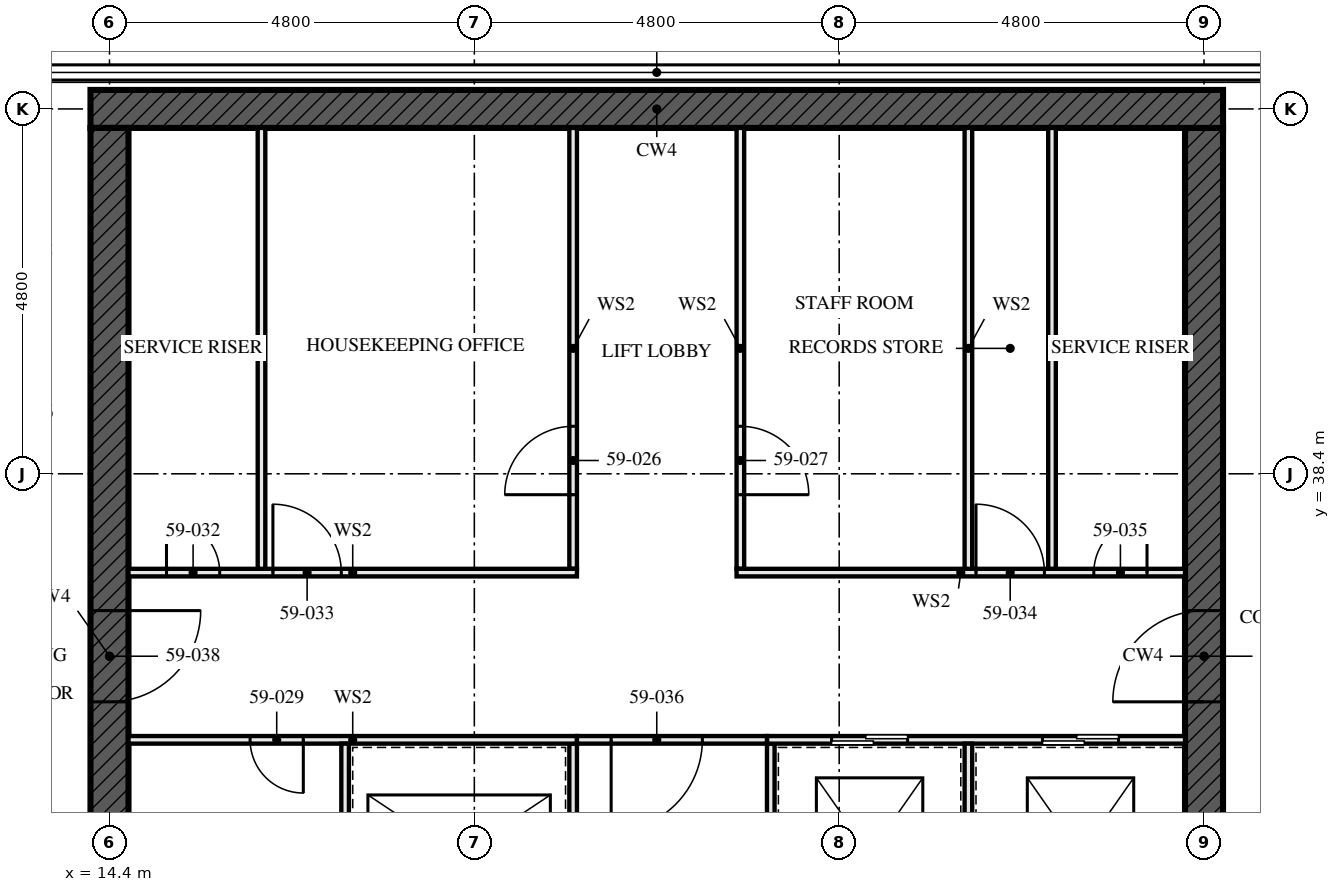
"""IFC4 building model, lengths in metres.
Left out: names, types, materials, properties, quantities, classifications, styles, units other than length and angle.
Written with IfcOpenShell. Run it as: python <this file> out.ifc"""

import sys

from ifc_helpers import new_model, si_unit, direction, frame, frame_2d, origin, place, context, subcontext, project, spatial, rectangle, extrude, element, fill, save


model = new_model("IFC4")
c1 = context("Model", 3, precision=1e-05, world=origin(), true_north=direction((0.0, 1.0)))
c2 = subcontext(c1, "Body", "Model", "MODEL_VIEW")
j1 = project(units=[si_unit("LENGTHUNIT", "METRE"), si_unit("PLANEANGLEUNIT", "RADIAN")], contexts=[c1])
p1 = place(None, origin())
s1 = spatial("IfcSite", under=j1, at=p1, CompositionType="ELEMENT")
p2 = place(p1, origin())
s2 = spatial("IfcBuilding", under=s1, at=p2, CompositionType="ELEMENT")
p3 = place(p2, frame((0.0, 0.0, 215.5)))
s3 = spatial("IfcBuildingStorey", under=s2, at=p3, CompositionType="ELEMENT", Elevation=215.5)
p4 = place(p3, frame((29.05, 43.2, -0.17), z_axis=(0.0, 0.0, 1.0), x_axis=(-1.0, 0.0, 0.0)))
e1 = element("IfcWall", 1, at=p4, inside=s3, PredefinedType="SHEAR", context=c2, shape_type="SweptSolid", body=[
    extrude(rectangle(XDim=14.9, YDim=0.5, at=frame_2d((7.45, 0.0))), origin(), (0.0, 0.0, 1.0), 3.5),
])
p5 = place(p3, frame((14.4, 42.95, -0.17), z_axis=(0.0, 0.0, 1.0), x_axis=(0.0, -1.0, 0.0)))
e2 = element("IfcWall", 2, at=p5, inside=s3, PredefinedType="SHEAR", context=c2, shape_type="SweptSolid", body=[
    extrude(rectangle(XDim=13.9, YDim=0.5, at=frame_2d((6.95, 0.0))), origin(), (0.0, 0.0, 1.0), 3.5),
])
p6 = place(p5, frame((6.35, 0.0, 0.17)))
e3 = element("IfcOpeningElement", 3, at=p6, cuts=e2, PredefinedType="OPENING", context=c2, shape_type="SweptSolid", body=[
    extrude(rectangle(XDim=1.2, YDim=2.1, at=frame_2d((0.6, 1.05))), frame((0.0, 0.26, 0.0), z_axis=(0.0, -1.0, 0.0), x_axis=(1.0, 0.0, 0.0)), (0.0, 0.0, 1.0), 0.521),
])
p7 = place(p3, frame((28.8, 29.05, -0.17), z_axis=(0.0, 0.0, 1.0), x_axis=(0.0, 1.0, 0.0)))
e4 = element("IfcWall", 4, at=p7, inside=s3, PredefinedType="SHEAR", context=c2, shape_type="SweptSolid", body=[
    extrude(rectangle(XDim=13.9, YDim=0.5, at=frame_2d((6.95, 0.0))), origin(), (0.0, 0.0, 1.0), 3.5),
])
p8 = place(p7, frame((6.35, 0.0, 0.17)))
e5 = element("IfcOpeningElement", 5, at=p8, cuts=e4, PredefinedType="OPENING", context=c2, shape_type="SweptSolid", body=[
    extrude(rectangle(XDim=1.2, YDim=2.1, at=frame_2d((0.6, 1.05))), frame((0.0, 0.26, 0.0), z_axis=(0.0, -1.0, 0.0), x_axis=(1.0, 0.0, 0.0)), (0.0, 0.0, 1.0), 0.521),
])
for number, where, z_axis, x_axis in (
    (6, (16.4, 37.15, 0.0), (0.0, 0.0, 1.0), (0.0, 1.0, 0.0)),
    (7, (26.8, 37.15, 0.0), (0.0, 0.0, 1.0), (0.0, 1.0, 0.0)),
):
    element("IfcWall", number, at=place(p3, frame(where, z_axis=z_axis, x_axis=x_axis)), inside=s3, PredefinedType="SOLIDWALL", context=c2, shape_type="SweptSolid", body=[
        extrude(rectangle(XDim=5.8, YDim=0.1, at=frame_2d((2.9, 0.0))), origin(), (0.0, 0.0, 1.0), 3.33),
    ])
p9 = place(p3, frame((20.5, 29.05, 0.0), z_axis=(0.0, 0.0, 1.0), x_axis=(0.0, 1.0, 0.0)))
e8 = element("IfcWall", 8, at=p9, inside=s3, PredefinedType="SOLIDWALL", context=c2, shape_type="SweptSolid", body=[
    extrude(rectangle(XDim=5.8, YDim=0.1, at=frame_2d((2.9, 0.0))), origin(), (0.0, 0.0, 1.0), 3.33),
])
p10 = place(p9, frame((0.8, 0.0, 0.0)))
e9 = element("IfcOpeningElement", 9, at=p10, cuts=e8, PredefinedType="OPENING", context=c2, shape_type="SweptSolid", body=[
    extrude(rectangle(XDim=1.1, YDim=2.3, at=frame_2d((0.55, 1.15))), frame((0.0, 0.061, 0.0), z_axis=(0.0, -1.0, 0.0), x_axis=(1.0, 0.0, 0.0)), (0.0, 0.0, 1.0), 0.121),
])
p11 = place(p9, frame((3.775, 0.0, 0.0)))
e10 = element("IfcOpeningElement", 10, at=p11, cuts=e8, PredefinedType="OPENING", context=c2, shape_type="SweptSolid", body=[
    extrude(rectangle(XDim=1.1, YDim=2.3, at=frame_2d((0.55, 1.15))), frame((0.0, 0.061, 0.0), z_axis=(0.0, -1.0, 0.0), x_axis=(1.0, 0.0, 0.0)), (0.0, 0.0, 1.0), 0.121),
])
p12 = place(p3, frame((20.5, 37.15, 0.0), z_axis=(0.0, 0.0, 1.0), x_axis=(0.0, 1.0, 0.0)))
e11 = element("IfcWall", 11, at=p12, inside=s3, PredefinedType="SOLIDWALL", context=c2, shape_type="SweptSolid", body=[
    extrude(rectangle(XDim=5.8, YDim=0.1, at=frame_2d((2.9, 0.0))), origin(), (0.0, 0.0, 1.0), 3.33),
])
p13 = place(p12, frame((0.975, 0.0, 0.0)))
e12 = element("IfcOpeningElement", 12, at=p13, cuts=e11, PredefinedType="OPENING", context=c2, shape_type="SweptSolid", body=[
    extrude(rectangle(XDim=0.9, YDim=2.1, at=frame_2d((0.45, 1.05))), frame((0.0, 0.061, 0.0), z_axis=(0.0, -1.0, 0.0), x_axis=(1.0, 0.0, 0.0)), (0.0, 0.0, 1.0), 0.121),
])
p14 = place(p3, frame((22.7, 37.15, 0.0), z_axis=(0.0, 0.0, 1.0), x_axis=(0.0, 1.0, 0.0)))
e13 = element("IfcWall", 13, at=p14, inside=s3, PredefinedType="SOLIDWALL", context=c2, shape_type="SweptSolid", body=[
    extrude(rectangle(XDim=5.8, YDim=0.1, at=frame_2d((2.9, 0.0))), origin(), (0.0, 0.0, 1.0), 3.33),
])
p15 = place(p14, frame((0.975, 0.0, 0.0)))
e14 = element("IfcOpeningElement", 14, at=p15, cuts=e13, PredefinedType="OPENING", context=c2, shape_type="SweptSolid", body=[
    extrude(rectangle(XDim=0.9, YDim=2.1, at=frame_2d((0.45, 1.05))), frame((0.0, 0.061, 0.0), z_axis=(0.0, -1.0, 0.0), x_axis=(1.0, 0.0, 0.0)), (0.0, 0.0, 1.0), 0.121),
])
p16 = place(p3, frame((23.1, 29.05, 0.0), z_axis=(0.0, 0.0, 1.0), x_axis=(0.0, 1.0, 0.0)))
e15 = element("IfcWall", 15, at=p16, inside=s3, PredefinedType="SOLIDWALL", context=c2, shape_type="SweptSolid", body=[
    extrude(rectangle(XDim=5.8, YDim=0.1, at=frame_2d((2.9, 0.0))), origin(), (0.0, 0.0, 1.0), 3.33),
])
p17 = place(p16, frame((1.0, 0.0, 0.0)))
e16 = element("IfcOpeningElement", 16, at=p17, cuts=e15, PredefinedType="OPENING", context=c2, shape_type="SweptSolid", body=[
    extrude(rectangle(XDim=0.7, YDim=2.1, at=frame_2d((0.35, 1.05))), frame((0.0, 0.061, 0.0), z_axis=(0.0, -1.0, 0.0), x_axis=(1.0, 0.0, 0.0)), (0.0, 0.0, 1.0), 0.121),
])
p18 = place(p3, frame((14.65, 34.9, 0.0), z_axis=(0.0, 0.0, 1.0), x_axis=(1.0, 0.0, 0.0)))
e17 = element("IfcWall", 17, at=p18, inside=s3, PredefinedType="SOLIDWALL", context=c2, shape_type="SweptSolid", body=[
    extrude(rectangle(XDim=5.9, YDim=0.1, at=frame_2d((2.95, 0.0))), origin(), (0.0, 0.0, 1.0), 3.33),
])
p19 = place(p18, frame((1.6, 0.0, 0.0)))
e18 = element("IfcOpeningElement", 18, at=p19, cuts=e17, PredefinedType="OPENING", context=c2, shape_type="SweptSolid", body=[
    extrude(rectangle(XDim=0.7, YDim=2.1, at=frame_2d((0.35, 1.05))), frame((0.0, 0.061, 0.0), z_axis=(0.0, -1.0, 0.0), x_axis=(1.0, 0.0, 0.0)), (0.0, 0.0, 1.0), 0.121),
])
p20 = place(p3, frame((23.05, 34.9, 0.0), z_axis=(0.0, 0.0, 1.0), x_axis=(1.0, 0.0, 0.0)))
e19 = element("IfcWall", 19, at=p20, inside=s3, PredefinedType="SOLIDWALL", context=c2, shape_type="SweptSolid", body=[
    extrude(rectangle(XDim=5.5, YDim=0.1, at=frame_2d((2.75, 0.0))), origin(), (0.0, 0.0, 1.0), 3.33),
])
p21 = place(p20, frame((0.85, 0.0, 0.0)))
e20 = element("IfcOpeningElement", 20, at=p21, cuts=e19, PredefinedType="OPENING", context=c2, shape_type="SweptSolid", body=[
    extrude(rectangle(XDim=1.0, YDim=2.1, at=frame_2d((0.5, 1.05))), frame((0.0, 0.061, 0.0), z_axis=(0.0, -1.0, 0.0), x_axis=(1.0, 0.0, 0.0)), (0.0, 0.0, 1.0), 0.121),
])
p22 = place(p20, frame((3.625, 0.0, 0.0)))
e21 = element("IfcOpeningElement", 21, at=p22, cuts=e19, PredefinedType="OPENING", context=c2, shape_type="SweptSolid", body=[
    extrude(rectangle(XDim=1.0, YDim=2.1, at=frame_2d((0.5, 1.05))), frame((0.0, 0.061, 0.0), z_axis=(0.0, -1.0, 0.0), x_axis=(1.0, 0.0, 0.0)), (0.0, 0.0, 1.0), 0.121),
])
p23 = place(p3, frame((14.65, 37.1, 0.0), z_axis=(0.0, 0.0, 1.0), x_axis=(1.0, 0.0, 0.0)))
e22 = element("IfcWall", 22, at=p23, inside=s3, PredefinedType="SOLIDWALL", context=c2, shape_type="SweptSolid", body=[
    extrude(rectangle(XDim=5.9, YDim=0.1, at=frame_2d((2.95, 0.0))), origin(), (0.0, 0.0, 1.0), 3.33),
])
p24 = place(p23, frame((0.5, 0.0, 0.0)))
e23 = element("IfcOpeningElement", 23, at=p24, cuts=e22, PredefinedType="OPENING", context=c2, shape_type="SweptSolid", body=[
    extrude(rectangle(XDim=0.7, YDim=2.1, at=frame_2d((0.35, 1.05))), frame((0.0, 0.061, 0.0), z_axis=(0.0, -1.0, 0.0), x_axis=(1.0, 0.0, 0.0)), (0.0, 0.0, 1.0), 0.121),
])
p25 = place(p23, frame((1.9, 0.0, 0.0)))
e24 = element("IfcOpeningElement", 24, at=p25, cuts=e22, PredefinedType="OPENING", context=c2, shape_type="SweptSolid", body=[
    extrude(rectangle(XDim=0.9, YDim=2.1, at=frame_2d((0.45, 1.05))), frame((0.0, 0.061, 0.0), z_axis=(0.0, -1.0, 0.0), x_axis=(1.0, 0.0, 0.0)), (0.0, 0.0, 1.0), 0.121),
])
p26 = place(p3, frame((22.65, 37.1, 0.0), z_axis=(0.0, 0.0, 1.0), x_axis=(1.0, 0.0, 0.0)))
e25 = element("IfcWall", 25, at=p26, inside=s3, PredefinedType="SOLIDWALL", context=c2, shape_type="SweptSolid", body=[
    extrude(rectangle(XDim=5.9, YDim=0.1, at=frame_2d((2.95, 0.0))), origin(), (0.0, 0.0, 1.0), 3.33),
])
p27 = place(p26, frame((3.15, 0.0, 0.0)))
e26 = element("IfcOpeningElement", 26, at=p27, cuts=e25, PredefinedType="OPENING", context=c2, shape_type="SweptSolid", body=[
    extrude(rectangle(XDim=0.9, YDim=2.1, at=frame_2d((0.45, 1.05))), frame((0.0, 0.061, 0.0), z_axis=(0.0, -1.0, 0.0), x_axis=(1.0, 0.0, 0.0)), (0.0, 0.0, 1.0), 0.121),
])
p28 = place(p26, frame((4.7, 0.0, 0.0)))
e27 = element("IfcOpeningElement", 27, at=p28, cuts=e25, PredefinedType="OPENING", context=c2, shape_type="SweptSolid", body=[
    extrude(rectangle(XDim=0.7, YDim=2.1, at=frame_2d((0.35, 1.05))), frame((0.0, 0.061, 0.0), z_axis=(0.0, -1.0, 0.0), x_axis=(1.0, 0.0, 0.0)), (0.0, 0.0, 1.0), 0.121),
])
p29 = place(p3, frame((20.55, 34.9, 0.0), z_axis=(0.0, 0.0, 1.0), x_axis=(1.0, 0.0, 0.0)))
e28 = element("IfcWall", 28, at=p29, inside=s3, PredefinedType="SOLIDWALL", context=c2, shape_type="SweptSolid", body=[
    extrude(rectangle(XDim=2.5, YDim=0.1, at=frame_2d((1.25, 0.0))), origin(), (0.0, 0.0, 1.0), 3.33),
])
p30 = place(p29, frame((0.45, 0.0, 0.0)))
e29 = element("IfcOpeningElement", 29, at=p30, cuts=e28, PredefinedType="OPENING", context=c2, shape_type="SweptSolid", body=[
    extrude(rectangle(XDim=1.2, YDim=2.1, at=frame_2d((0.6, 1.05))), frame((0.0, 0.061, 0.0), z_axis=(0.0, -1.0, 0.0), x_axis=(1.0, 0.0, 0.0)), (0.0, 0.0, 1.0), 0.121),
])
for number, where, z_axis, x_axis in (
    (30, (17.5, 29.05, 0.0), (0.0, 0.0, 1.0), (0.0, 1.0, 0.0)),
    (31, (25.7, 37.15, 0.0), (0.0, 0.0, 1.0), (0.0, 1.0, 0.0)),
):
    element("IfcWall", number, at=place(p3, frame(where, z_axis=z_axis, x_axis=x_axis)), inside=s3, PredefinedType="SOLIDWALL", context=c2, shape_type="SweptSolid", body=[
        extrude(rectangle(XDim=5.8, YDim=0.1, at=frame_2d((2.9, 0.0))), origin(), (0.0, 0.0, 1.0), 3.33),
    ])
p31 = place(p3, frame((25.7, 31.95, 0.0), z_axis=(0.0, 0.0, 1.0), x_axis=(0.0, 1.0, 0.0)))
e32 = element("IfcWall", 32, at=p31, inside=s3, PredefinedType="SOLIDWALL", context=c2, shape_type="SweptSolid", body=[
    extrude(rectangle(XDim=2.9, YDim=0.1, at=frame_2d((1.45, 0.0))), origin(), (0.0, 0.0, 1.0), 3.33),
])
p32 = place(p13, origin())
e33 = element("IfcDoor", 33, at=p32, inside=s3, OperationType="SINGLE_SWING_RIGHT", PredefinedType="DOOR", context=c2, shape_type="SweptSolid", body=[
    extrude(rectangle(XDim=0.9, YDim=2.1, at=frame_2d((0.45, 1.05))), frame((0.0, 0.027, 0.0), z_axis=(0.0, -1.0, 0.0), x_axis=(1.0, 0.0, 0.0)), (0.0, 0.0, 1.0), 0.054),
])
fill(e12, e33)
p33 = place(p15, frame((0.9, 0.0, 0.0), z_axis=(0.0, 0.0, 1.0), x_axis=(-1.0, 0.0, 0.0)))
e34 = element("IfcDoor", 34, at=p33, inside=s3, OperationType="SINGLE_SWING_LEFT", PredefinedType="DOOR", context=c2, shape_type="SweptSolid", body=[
    extrude(rectangle(XDim=0.9, YDim=2.1, at=frame_2d((0.45, 1.05))), frame((0.0, 0.027, 0.0), z_axis=(0.0, -1.0, 0.0), x_axis=(1.0, 0.0, 0.0)), (0.0, 0.0, 1.0), 0.054),
])
fill(e14, e34)
p34 = place(p19, frame((0.7, 0.0, 0.0), z_axis=(0.0, 0.0, 1.0), x_axis=(-1.0, 0.0, 0.0)))
e35 = element("IfcDoor", 35, at=p34, inside=s3, OperationType="SINGLE_SWING_RIGHT", PredefinedType="DOOR", context=c2, shape_type="SweptSolid", body=[
    extrude(rectangle(XDim=0.7, YDim=2.1, at=frame_2d((0.35, 1.05))), frame((0.0, 0.027, 0.0), z_axis=(0.0, -1.0, 0.0), x_axis=(1.0, 0.0, 0.0)), (0.0, 0.0, 1.0), 0.054),
])
fill(e18, e35)
p35 = place(p21, origin())
e36 = element("IfcDoor", 36, at=p35, inside=s3, OperationType="SLIDING_TO_LEFT", PredefinedType="DOOR", context=c2, shape_type="SweptSolid", body=[
    extrude(rectangle(XDim=1.0, YDim=2.1, at=frame_2d((0.5, 1.05))), frame((0.0, 0.05, 0.0), z_axis=(0.0, -1.0, 0.0), x_axis=(1.0, 0.0, 0.0)), (0.0, 0.0, 1.0), 0.1),
])
fill(e20, e36)
p36 = place(p22, origin())
e37 = element("IfcDoor", 37, at=p36, inside=s3, OperationType="SLIDING_TO_LEFT", PredefinedType="DOOR", context=c2, shape_type="SweptSolid", body=[
    extrude(rectangle(XDim=1.0, YDim=2.1, at=frame_2d((0.5, 1.05))), frame((0.0, 0.05, 0.0), z_axis=(0.0, -1.0, 0.0), x_axis=(1.0, 0.0, 0.0)), (0.0, 0.0, 1.0), 0.1),
])
fill(e21, e37)
p37 = place(p24, origin())
e38 = element("IfcDoor", 38, at=p37, inside=s3, OperationType="SINGLE_SWING_RIGHT", PredefinedType="DOOR", context=c2, shape_type="SweptSolid", body=[
    extrude(rectangle(XDim=0.7, YDim=2.1, at=frame_2d((0.35, 1.05))), frame((0.0, 0.027, 0.0), z_axis=(0.0, -1.0, 0.0), x_axis=(1.0, 0.0, 0.0)), (0.0, 0.0, 1.0), 0.054),
])
fill(e23, e38)
p38 = place(p25, origin())
e39 = element("IfcDoor", 39, at=p38, inside=s3, OperationType="SINGLE_SWING_RIGHT", PredefinedType="DOOR", context=c2, shape_type="SweptSolid", body=[
    extrude(rectangle(XDim=0.9, YDim=2.1, at=frame_2d((0.45, 1.05))), frame((0.0, 0.027, 0.0), z_axis=(0.0, -1.0, 0.0), x_axis=(1.0, 0.0, 0.0)), (0.0, 0.0, 1.0), 0.054),
])
fill(e24, e39)
p39 = place(p27, origin())
e40 = element("IfcDoor", 40, at=p39, inside=s3, OperationType="SINGLE_SWING_RIGHT", PredefinedType="DOOR", context=c2, shape_type="SweptSolid", body=[
    extrude(rectangle(XDim=0.9, YDim=2.1, at=frame_2d((0.45, 1.05))), frame((0.0, 0.027, 0.0), z_axis=(0.0, -1.0, 0.0), x_axis=(1.0, 0.0, 0.0)), (0.0, 0.0, 1.0), 0.054),
])
fill(e26, e40)
p40 = place(p28, origin())
e41 = element("IfcDoor", 41, at=p40, inside=s3, OperationType="SINGLE_SWING_LEFT", PredefinedType="DOOR", context=c2, shape_type="SweptSolid", body=[
    extrude(rectangle(XDim=0.7, YDim=2.1, at=frame_2d((0.35, 1.05))), frame((0.0, 0.027, 0.0), z_axis=(0.0, -1.0, 0.0), x_axis=(1.0, 0.0, 0.0)), (0.0, 0.0, 1.0), 0.054),
])
fill(e27, e41)
p41 = place(p30, frame((1.2, 0.0, 0.0), z_axis=(0.0, 0.0, 1.0), x_axis=(-1.0, 0.0, 0.0)))
e42 = element("IfcDoor", 42, at=p41, inside=s3, OperationType="SINGLE_SWING_LEFT", PredefinedType="DOOR", context=c2, shape_type="SweptSolid", body=[
    extrude(rectangle(XDim=1.2, YDim=2.1, at=frame_2d((0.6, 1.05))), frame((0.0, 0.027, 0.0), z_axis=(0.0, -1.0, 0.0), x_axis=(1.0, 0.0, 0.0)), (0.0, 0.0, 1.0), 0.054),
])
fill(e29, e42)
p42 = place(p6, origin())
e43 = element("IfcDoor", 43, at=p42, inside=s3, OperationType="SINGLE_SWING_LEFT", PredefinedType="DOOR", context=c2, shape_type="SweptSolid", body=[
    extrude(rectangle(XDim=1.2, YDim=2.1, at=frame_2d((0.6, 1.05))), frame((0.0, 0.027, 0.0), z_axis=(0.0, -1.0, 0.0), x_axis=(1.0, 0.0, 0.0)), (0.0, 0.0, 1.0), 0.054),
])
fill(e3, e43)
p43 = place(p8, origin())
e44 = element("IfcDoor", 44, at=p43, inside=s3, OperationType="SINGLE_SWING_LEFT", PredefinedType="DOOR", context=c2, shape_type="SweptSolid", body=[
    extrude(rectangle(XDim=1.2, YDim=2.1, at=frame_2d((0.6, 1.05))), frame((0.0, 0.027, 0.0), z_axis=(0.0, -1.0, 0.0), x_axis=(1.0, 0.0, 0.0)), (0.0, 0.0, 1.0), 0.054),
])
fill(e5, e44)
save(model, sys.argv[1])
